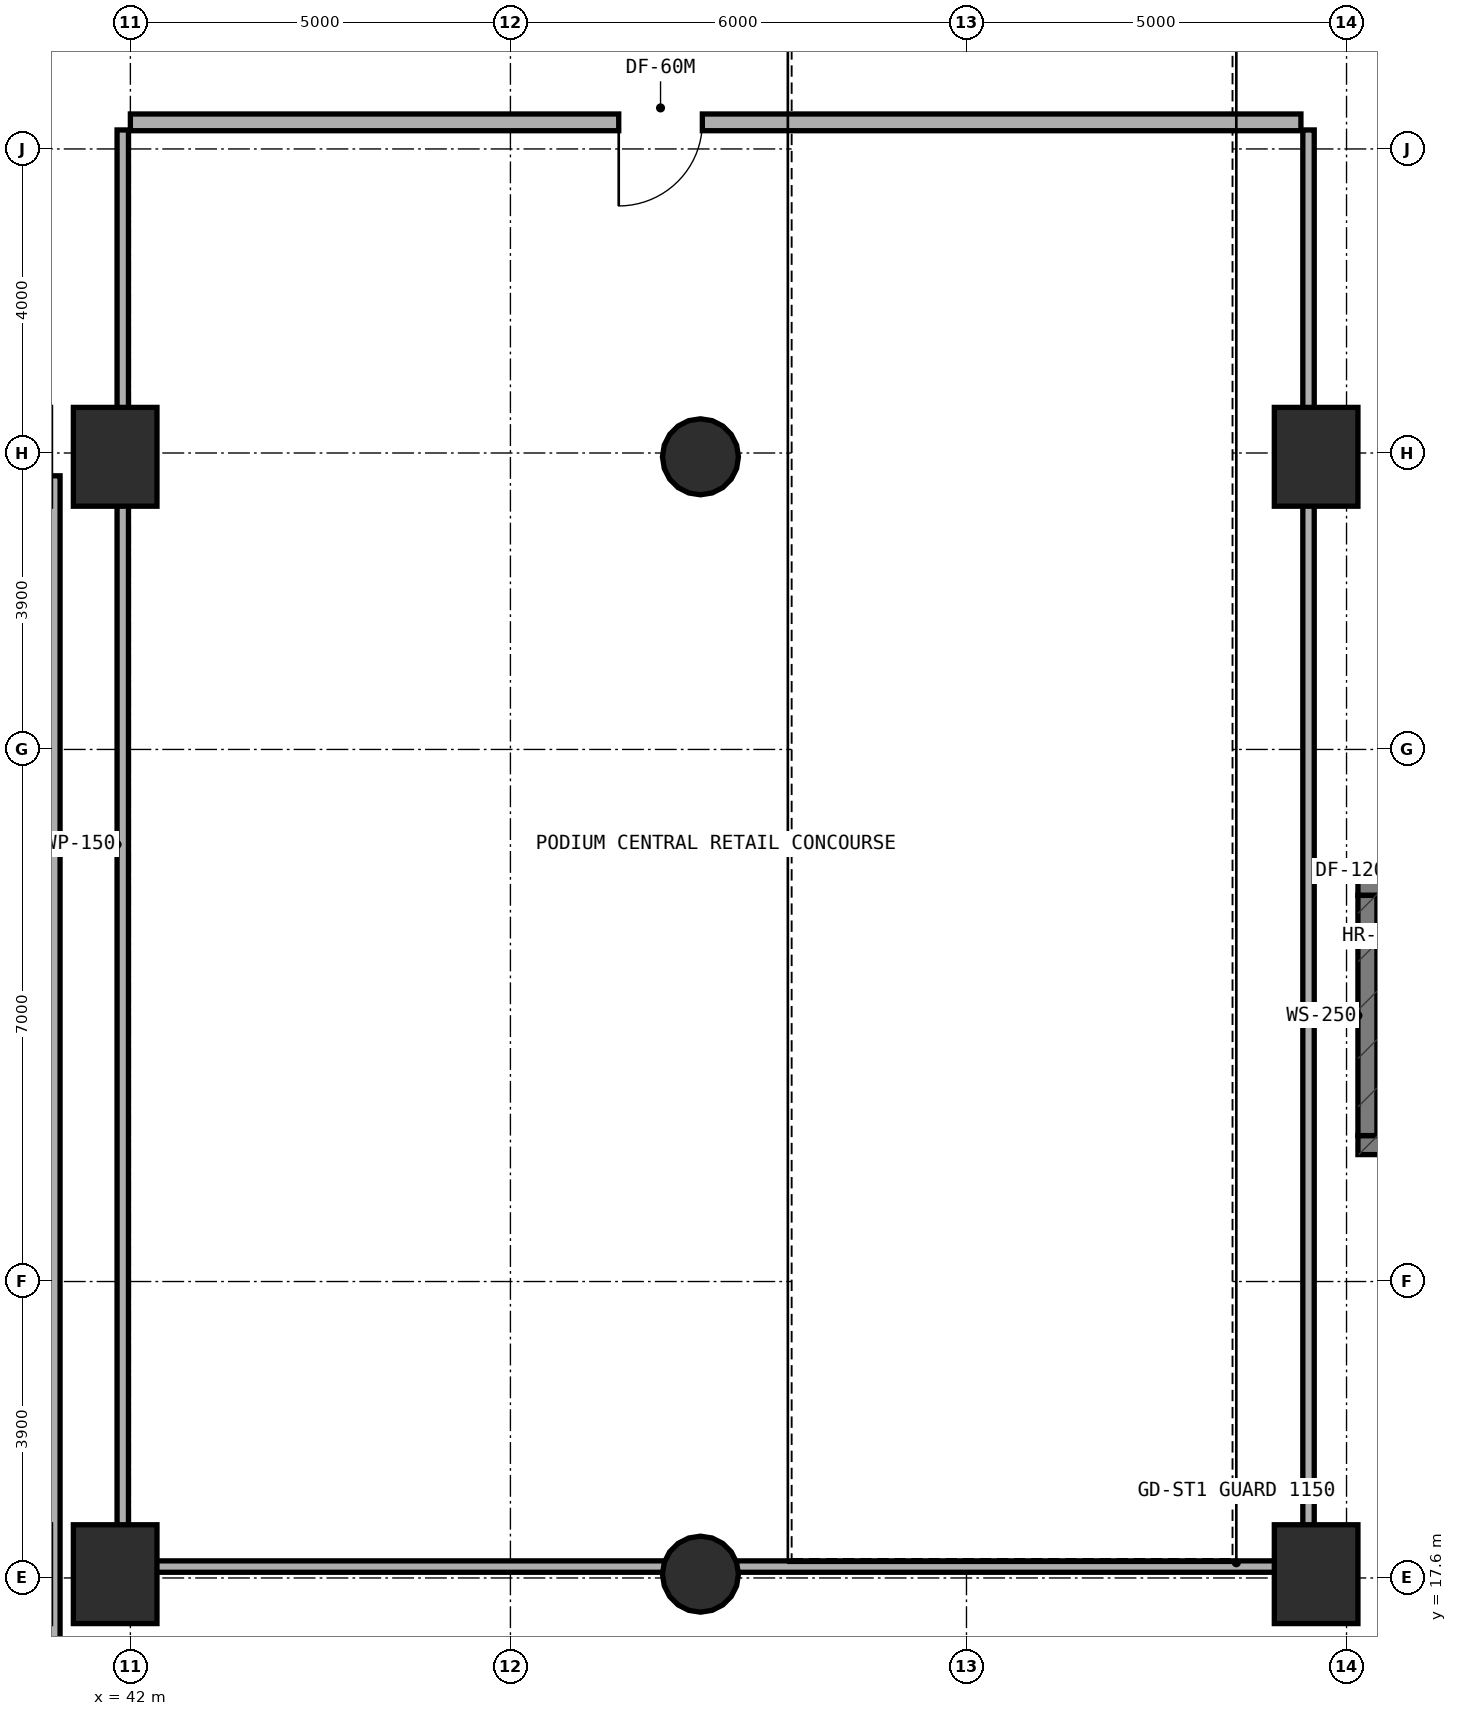
"""IFC4 building model, lengths in metres.
Left out: names, types, materials, properties, quantities, classifications, styles, units other than length and angle.
Written with IfcOpenShell. Run it as: python <this file> out.ifc"""

import sys

from ifc_helpers import new_model, si_unit, direction, frame, frame_2d, origin, origin_2d, place, context, subcontext, project, spatial, rectangle, circle, extrude, element, fill, save


model = new_model("IFC4")
c1 = context("Model", 3, precision=1e-05, world=origin(), true_north=direction((0.0, 1.0)))
c2 = subcontext(c1, "Body", "Model", "MODEL_VIEW")
j1 = project(units=[si_unit("LENGTHUNIT", "METRE"), si_unit("PLANEANGLEUNIT", "RADIAN")], contexts=[c1])
p1 = place(None, origin())
s1 = spatial("IfcSite", under=j1, at=p1, CompositionType="ELEMENT")
p2 = place(p1, origin())
s2 = spatial("IfcBuilding", under=s1, at=p2, CompositionType="ELEMENT")
p3 = place(p2, origin())
s3 = spatial("IfcBuildingStorey", under=s2, at=p3, CompositionType="ELEMENT", Elevation=0.0)
p4 = place(p3, frame((58.15, 23.295, 0.0), z_axis=(0.0, 0.0, 1.0), x_axis=(1.0, 0.0, 0.0)))
e1 = element("IfcWall", 1, at=p4, inside=s3, PredefinedType="STANDARD", context=c2, shape_type="SweptSolid", body=[
    extrude(rectangle(XDim=7.5, YDim=0.25, at=frame_2d((3.75, 0.0))), origin(), (0.0, 0.0, 1.0), 5.4),
])
p5 = place(p3, frame((58.15, 26.705, 0.0), z_axis=(0.0, 0.0, 1.0), x_axis=(1.0, 0.0, 0.0)))
e2 = element("IfcWall", 2, at=p5, inside=s3, PredefinedType="STANDARD", context=c2, shape_type="SweptSolid", body=[
    extrude(rectangle(XDim=7.5, YDim=0.25, at=frame_2d((3.75, 0.0))), origin(), (0.0, 0.0, 1.0), 5.4),
])
p6 = place(p5, frame((0.98, 0.0, 0.0)))
e3 = element("IfcOpeningElement", 3, at=p6, cuts=e2, PredefinedType="OPENING", context=c2, shape_type="SweptSolid", body=[
    extrude(rectangle(XDim=1.2, YDim=2.15, at=frame_2d((0.6, 1.075))), frame((0.0, 0.135, 0.0), z_axis=(0.0, -1.0, 0.0), x_axis=(1.0, 0.0, 0.0)), (0.0, 0.0, 1.0), 0.27),
])
p7 = place(p3, frame((58.275, 23.42, 0.0), z_axis=(0.0, 0.0, 1.0), x_axis=(0.0, 1.0, 0.0)))
e4 = element("IfcWall", 4, at=p7, inside=s3, PredefinedType="STANDARD", context=c2, shape_type="SweptSolid", body=[
    extrude(rectangle(XDim=3.16, YDim=0.25, at=frame_2d((1.58, 0.0))), origin(), (0.0, 0.0, 1.0), 5.4),
])
for number, where, z_axis, x_axis in (
    (5, (41.8, 17.65, 0.0), (0.0, 0.0, 1.0), (1.0, 0.0, 0.0)),
    (6, (41.8, 32.35, 0.0), (0.0, 0.0, 1.0), (1.0, 0.0, 0.0)),
):
    element("IfcColumn", number, at=place(p3, frame(where, z_axis=z_axis, x_axis=x_axis)), inside=s3, PredefinedType="COLUMN", context=c2, shape_type="SweptSolid", body=[
        extrude(rectangle(XDim=1.1, YDim=1.3, at=origin_2d()), origin(), (0.0, 0.0, 1.0), 5.4),
    ])
for number, where, z_axis, x_axis in (
    (7, (49.5, 17.65, 0.0), (0.0, 0.0, 1.0), (1.0, 0.0, 0.0)),
    (8, (49.5, 32.35, 0.0), (0.0, 0.0, 1.0), (1.0, 0.0, 0.0)),
):
    element("IfcColumn", number, at=place(p3, frame(where, z_axis=z_axis, x_axis=x_axis)), inside=s3, PredefinedType="COLUMN", context=c2, shape_type="SweptSolid", body=[
        extrude(circle(Radius=0.5, at=origin_2d()), origin(), (0.0, 0.0, 1.0), 5.4),
    ])
for number, where, z_axis, x_axis in (
    (9, (57.6, 17.65, 0.0), (0.0, 0.0, 1.0), (1.0, 0.0, 0.0)),
    (10, (57.6, 32.35, 0.0), (0.0, 0.0, 1.0), (1.0, 0.0, 0.0)),
):
    element("IfcColumn", number, at=place(p3, frame(where, z_axis=z_axis, x_axis=x_axis)), inside=s3, PredefinedType="COLUMN", context=c2, shape_type="SweptSolid", body=[
        extrude(rectangle(XDim=1.1, YDim=1.3, at=origin_2d()), origin(), (0.0, 0.0, 1.0), 5.4),
    ])
p8 = place(p3, frame((41.0, 13.35, 0.0), z_axis=(0.0, 0.0, 1.0), x_axis=(0.0, 1.0, 0.0)))
e11 = element("IfcWall", 11, at=p8, inside=s3, PredefinedType="PARTITIONING", context=c2, shape_type="SweptSolid", body=[
    extrude(rectangle(XDim=18.75, YDim=0.15, at=frame_2d((9.375, 0.0))), origin(), (0.0, 0.0, 1.0), 4.525),
])
p9 = place(p3, frame((41.9, 17.85, 0.0), z_axis=(0.0, 0.0, 1.0), x_axis=(0.0, 1.0, 0.0)))
e12 = element("IfcWall", 12, at=p9, inside=s3, PredefinedType="PARTITIONING", context=c2, shape_type="SweptSolid", body=[
    extrude(rectangle(XDim=18.8, YDim=0.15, at=frame_2d((9.4, 0.0))), origin(), (0.0, 0.0, 1.0), 4.325),
])
p10 = place(p3, frame((57.5, 17.85, 0.0), z_axis=(0.0, 0.0, 1.0), x_axis=(0.0, 1.0, 0.0)))
e13 = element("IfcWall", 13, at=p10, inside=s3, PredefinedType="PARTITIONING", context=c2, shape_type="SweptSolid", body=[
    extrude(rectangle(XDim=18.8, YDim=0.15, at=frame_2d((9.4, 0.0))), origin(), (0.0, 0.0, 1.0), 3.325),
])
p11 = place(p3, frame((42.0, 17.75, 0.0), z_axis=(0.0, 0.0, 1.0), x_axis=(1.0, 0.0, 0.0)))
e14 = element("IfcWall", 14, at=p11, inside=s3, PredefinedType="PARTITIONING", context=c2, shape_type="SweptSolid", body=[
    extrude(rectangle(XDim=15.4, YDim=0.15, at=frame_2d((7.7, 0.0))), origin(), (0.0, 0.0, 1.0), 4.325),
])
p12 = place(p3, frame((42.0, 36.75, 0.0), z_axis=(0.0, 0.0, 1.0), x_axis=(1.0, 0.0, 0.0)))
e15 = element("IfcWall", 15, at=p12, inside=s3, PredefinedType="SOLIDWALL", context=c2, shape_type="SweptSolid", body=[
    extrude(rectangle(XDim=15.4, YDim=0.22, at=frame_2d((7.7, 0.0))), origin(), (0.0, 0.0, 1.0), 5.05),
])
p13 = place(p12, frame((6.425, 0.0, 0.0)))
e16 = element("IfcOpeningElement", 16, at=p13, cuts=e15, PredefinedType="OPENING", context=c2, shape_type="SweptSolid", body=[
    extrude(rectangle(XDim=1.1, YDim=2.1, at=frame_2d((0.55, 1.05))), frame((0.0, 0.12, 0.0), z_axis=(0.0, -1.0, 0.0), x_axis=(1.0, 0.0, 0.0)), (0.0, 0.0, 1.0), 0.24),
])
p14 = place(p13, frame((1.1, 0.0, 0.0), z_axis=(0.0, 0.0, 1.0), x_axis=(-1.0, 0.0, 0.0)))
e17 = element("IfcDoor", 17, at=p14, inside=s3, OperationType="SINGLE_SWING_RIGHT", PredefinedType="DOOR", context=c2, shape_type="SweptSolid", body=[
    extrude(rectangle(XDim=1.1, YDim=2.1, at=frame_2d((0.55, 1.05))), frame((0.0, 0.025, 0.0), z_axis=(0.0, -1.0, 0.0), x_axis=(1.0, 0.0, 0.0)), (0.0, 0.0, 1.0), 0.05),
])
fill(e16, e17)
save(model, sys.argv[1])
